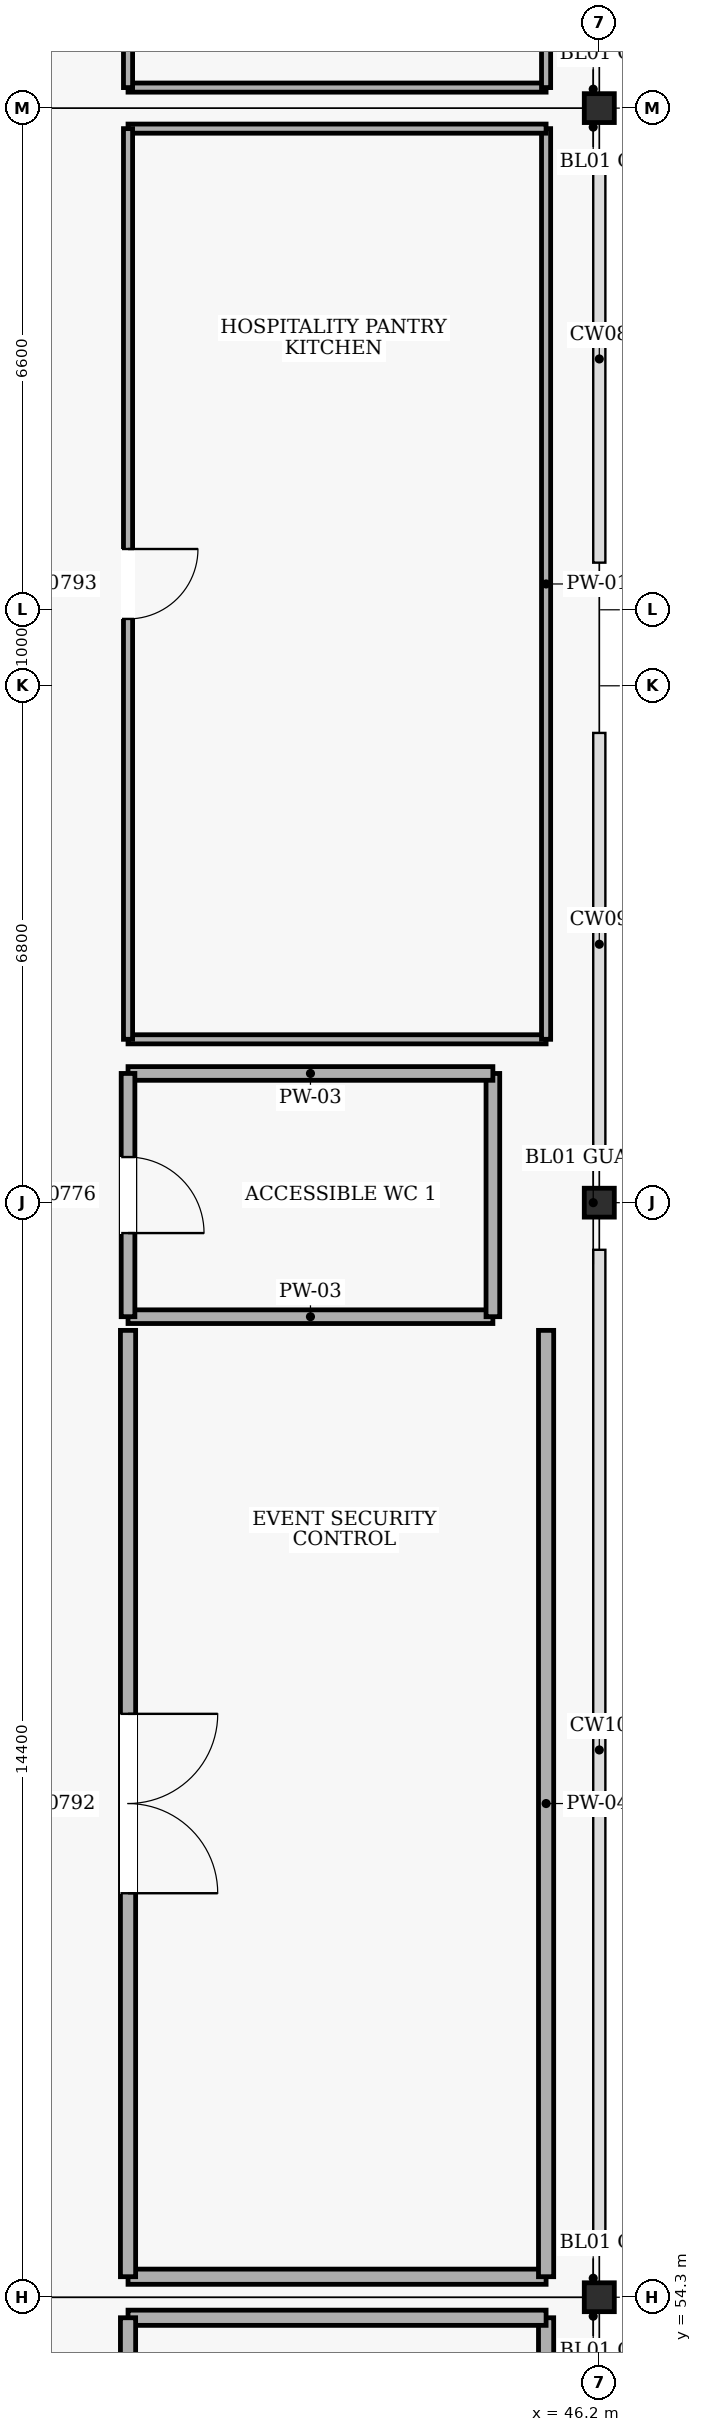
"""IFC4 building model, lengths in metres.
Left out: names, types, materials, properties, quantities, classifications, styles, units other than length and angle.
Written with IfcOpenShell. Run it as: python <this file> out.ifc"""

import sys

from ifc_helpers import new_model, si_unit, direction, frame, frame_2d, origin, origin_2d, place, context, subcontext, project, spatial, rectangle, i_section, extrude, element, fill, save


model = new_model("IFC4")
c1 = context("Model", 3, precision=1e-05, world=origin(), true_north=direction((0.0, 1.0)))
c2 = subcontext(c1, "Body", "Model", "MODEL_VIEW")
j1 = project(units=[si_unit("LENGTHUNIT", "METRE"), si_unit("PLANEANGLEUNIT", "RADIAN")], contexts=[c1])
p1 = place(None, origin())
s1 = spatial("IfcSite", under=j1, at=p1, CompositionType="ELEMENT")
p2 = place(p1, origin())
s2 = spatial("IfcBuilding", under=s1, at=p2, CompositionType="ELEMENT")
p3 = place(p2, frame((0.0, 0.0, 24.6)))
s3 = spatial("IfcBuildingStorey", under=s2, at=p3, CompositionType="ELEMENT", Elevation=24.6)
for number, where, z_axis, x_axis in (
    (1, (46.2, 54.3, 0.0), (0.0, 0.0, 1.0), (1.0, 0.0, 0.0)),
    (2, (46.2, 68.7, 0.0), (0.0, 0.0, 1.0), (1.0, 0.0, 0.0)),
    (3, (46.2, 83.1, 0.0), (0.0, 0.0, 1.0), (1.0, 0.0, 0.0)),
):
    element("IfcColumn", number, at=place(p3, frame(where, z_axis=z_axis, x_axis=x_axis)), inside=s3, PredefinedType="COLUMN", context=c2, shape_type="SweptSolid", body=[
        extrude(i_section(OverallWidth=0.395, OverallDepth=0.38, WebThickness=0.019, FlangeThickness=0.03, at=origin_2d()), origin(), (0.0, 0.0, 1.0), 4.8),
    ])
p4 = place(p3, frame((40.0, 67.2, 0.0), z_axis=(0.0, 0.0, 1.0), x_axis=(1.0, 0.0, 0.0)))
e4 = element("IfcWall", 4, at=p4, inside=s3, PredefinedType="PARTITIONING", context=c2, shape_type="SweptSolid", body=[
    extrude(rectangle(XDim=4.8, YDim=0.18, at=frame_2d((2.4, 0.0))), origin(), (0.0, 0.0, 1.0), 4.5),
])
p5 = place(p3, frame((44.8, 67.2, 0.0), z_axis=(0.0, 0.0, 1.0), x_axis=(0.0, 1.0, 0.0)))
e5 = element("IfcWall", 5, at=p5, inside=s3, PredefinedType="PARTITIONING", context=c2, shape_type="SweptSolid", body=[
    extrude(rectangle(XDim=3.2, YDim=0.18, at=frame_2d((1.6, 0.0))), origin(), (0.0, 0.0, 1.0), 4.5),
])
p6 = place(p3, frame((44.8, 70.4, 0.0), z_axis=(0.0, 0.0, 1.0), x_axis=(-1.0, 0.0, 0.0)))
e6 = element("IfcWall", 6, at=p6, inside=s3, PredefinedType="PARTITIONING", context=c2, shape_type="SweptSolid", body=[
    extrude(rectangle(XDim=4.8, YDim=0.18, at=frame_2d((2.4, 0.0))), origin(), (0.0, 0.0, 1.0), 4.5),
])
p7 = place(p3, frame((40.0, 70.4, 0.0), z_axis=(0.0, 0.0, 1.0), x_axis=(0.0, -1.0, 0.0)))
e7 = element("IfcWall", 7, at=p7, inside=s3, PredefinedType="PARTITIONING", context=c2, shape_type="SweptSolid", body=[
    extrude(rectangle(XDim=3.2, YDim=0.18, at=frame_2d((1.6, 0.0))), origin(), (0.0, 0.0, 1.0), 4.5),
])
p8 = place(p7, frame((1.1, 0.0, 0.0)))
e8 = element("IfcOpeningElement", 8, at=p8, cuts=e7, PredefinedType="OPENING", context=c2, shape_type="SweptSolid", body=[
    extrude(rectangle(XDim=1.0, YDim=2.1, at=frame_2d((0.5, 1.05))), frame((0.0, 0.1, 0.0), z_axis=(0.0, -1.0, 0.0), x_axis=(1.0, 0.0, 0.0)), (0.0, 0.0, 1.0), 0.2),
])
p9 = place(p3, frame((45.5, 45.231, 0.0), z_axis=(0.0, 0.0, 1.0), x_axis=(0.0, 1.0, 0.0)))
e9 = element("IfcWall", 9, at=p9, inside=s3, PredefinedType="PARTITIONING", context=c2, shape_type="SweptSolid", body=[
    extrude(rectangle(XDim=8.799, YDim=0.2, at=frame_2d((4.4, 0.0))), origin(), (0.0, 0.0, 1.0), 4.5),
])
p10 = place(p3, frame((45.5, 54.03, 0.0), z_axis=(0.0, 0.0, 1.0), x_axis=(-1.0, 0.0, 0.0)))
e10 = element("IfcWall", 10, at=p10, inside=s3, PredefinedType="PARTITIONING", context=c2, shape_type="SweptSolid", body=[
    extrude(rectangle(XDim=5.5, YDim=0.2, at=frame_2d((2.75, 0.0))), origin(), (0.0, 0.0, 1.0), 3.78),
])
p11 = place(p3, frame((40.0, 54.03, 0.0), z_axis=(0.0, 0.0, 1.0), x_axis=(0.0, -1.0, 0.0)))
e11 = element("IfcWall", 11, at=p11, inside=s3, PredefinedType="PARTITIONING", context=c2, shape_type="SweptSolid", body=[
    extrude(rectangle(XDim=8.799, YDim=0.2, at=frame_2d((4.4, 0.0))), origin(), (0.0, 0.0, 1.0), 4.5),
])
p12 = place(p11, frame((3.469, 0.0, 0.0)))
e12 = element("IfcOpeningElement", 12, at=p12, cuts=e11, PredefinedType="OPENING", context=c2, shape_type="SweptSolid", body=[
    extrude(rectangle(XDim=1.86, YDim=2.3, at=frame_2d((0.93, 1.15))), frame((0.0, 0.11, 0.0), z_axis=(0.0, -1.0, 0.0), x_axis=(1.0, 0.0, 0.0)), (0.0, 0.0, 1.0), 0.22),
])
p13 = place(p3, frame((40.0, 54.57, 0.0), z_axis=(0.0, 0.0, 1.0), x_axis=(1.0, 0.0, 0.0)))
e13 = element("IfcWall", 13, at=p13, inside=s3, PredefinedType="PARTITIONING", context=c2, shape_type="SweptSolid", body=[
    extrude(rectangle(XDim=5.5, YDim=0.2, at=frame_2d((2.75, 0.0))), origin(), (0.0, 0.0, 1.0), 3.78),
])
p14 = place(p3, frame((45.5, 54.57, 0.0), z_axis=(0.0, 0.0, 1.0), x_axis=(0.0, 1.0, 0.0)))
e14 = element("IfcWall", 14, at=p14, inside=s3, PredefinedType="PARTITIONING", context=c2, shape_type="SweptSolid", body=[
    extrude(rectangle(XDim=12.45, YDim=0.2, at=frame_2d((6.225, 0.0))), origin(), (0.0, 0.0, 1.0), 4.5),
])
p15 = place(p3, frame((40.0, 67.02, 0.0), z_axis=(0.0, 0.0, 1.0), x_axis=(0.0, -1.0, 0.0)))
e15 = element("IfcWall", 15, at=p15, inside=s3, PredefinedType="PARTITIONING", context=c2, shape_type="SweptSolid", body=[
    extrude(rectangle(XDim=12.45, YDim=0.2, at=frame_2d((6.225, 0.0))), origin(), (0.0, 0.0, 1.0), 4.5),
])
p16 = place(p15, frame((5.045, 0.0, 0.0)))
e16 = element("IfcOpeningElement", 16, at=p16, cuts=e15, PredefinedType="OPENING", context=c2, shape_type="SweptSolid", body=[
    extrude(rectangle(XDim=2.36, YDim=2.4, at=frame_2d((1.18, 1.2))), frame((0.0, 0.11, 0.0), z_axis=(0.0, -1.0, 0.0), x_axis=(1.0, 0.0, 0.0)), (0.0, 0.0, 1.0), 0.22),
])
p17 = place(p3, frame((40.0, 70.849, 0.0), z_axis=(0.0, 0.0, 1.0), x_axis=(1.0, 0.0, 0.0)))
e17 = element("IfcWall", 17, at=p17, inside=s3, PredefinedType="PARTITIONING", context=c2, shape_type="SweptSolid", body=[
    extrude(rectangle(XDim=5.5, YDim=0.12, at=frame_2d((2.75, 0.0))), origin(), (0.0, 0.0, 1.0), 4.5),
])
p18 = place(p3, frame((45.5, 70.849, 0.0), z_axis=(0.0, 0.0, 1.0), x_axis=(0.0, 1.0, 0.0)))
e18 = element("IfcWall", 18, at=p18, inside=s3, PredefinedType="PARTITIONING", context=c2, shape_type="SweptSolid", body=[
    extrude(rectangle(XDim=11.981, YDim=0.12, at=frame_2d((5.99, 0.0))), origin(), (0.0, 0.0, 1.0), 4.5),
])
p19 = place(p3, frame((45.5, 82.83, 0.0), z_axis=(0.0, 0.0, 1.0), x_axis=(-1.0, 0.0, 0.0)))
e19 = element("IfcWall", 19, at=p19, inside=s3, PredefinedType="PARTITIONING", context=c2, shape_type="SweptSolid", body=[
    extrude(rectangle(XDim=5.5, YDim=0.12, at=frame_2d((2.75, 0.0))), origin(), (0.0, 0.0, 1.0), 3.78),
])
p20 = place(p3, frame((40.0, 82.83, 0.0), z_axis=(0.0, 0.0, 1.0), x_axis=(0.0, -1.0, 0.0)))
e20 = element("IfcWall", 20, at=p20, inside=s3, PredefinedType="PARTITIONING", context=c2, shape_type="SweptSolid", body=[
    extrude(rectangle(XDim=11.981, YDim=0.12, at=frame_2d((5.99, 0.0))), origin(), (0.0, 0.0, 1.0), 4.5),
])
p21 = place(p20, frame((5.531, 0.0, 0.0)))
e21 = element("IfcOpeningElement", 21, at=p21, cuts=e20, PredefinedType="OPENING", context=c2, shape_type="SweptSolid", body=[
    extrude(rectangle(XDim=0.92, YDim=2.1, at=frame_2d((0.46, 1.05))), frame((0.0, 0.07, 0.0), z_axis=(0.0, -1.0, 0.0), x_axis=(1.0, 0.0, 0.0)), (0.0, 0.0, 1.0), 0.14),
])
p22 = place(p3, frame((40.0, 83.37, 0.0), z_axis=(0.0, 0.0, 1.0), x_axis=(1.0, 0.0, 0.0)))
e22 = element("IfcWall", 22, at=p22, inside=s3, PredefinedType="PARTITIONING", context=c2, shape_type="SweptSolid", body=[
    extrude(rectangle(XDim=5.5, YDim=0.12, at=frame_2d((2.75, 0.0))), origin(), (0.0, 0.0, 1.0), 3.78),
])
p23 = place(p3, frame((45.5, 83.37, 0.0), z_axis=(0.0, 0.0, 1.0), x_axis=(0.0, 1.0, 0.0)))
e23 = element("IfcWall", 23, at=p23, inside=s3, PredefinedType="PARTITIONING", context=c2, shape_type="SweptSolid", body=[
    extrude(rectangle(XDim=8.654, YDim=0.12, at=frame_2d((4.327, 0.0))), origin(), (0.0, 0.0, 1.0), 4.5),
])
p24 = place(p3, frame((40.0, 92.024, 0.0), z_axis=(0.0, 0.0, 1.0), x_axis=(0.0, -1.0, 0.0)))
e24 = element("IfcWall", 24, at=p24, inside=s3, PredefinedType="PARTITIONING", context=c2, shape_type="SweptSolid", body=[
    extrude(rectangle(XDim=8.654, YDim=0.12, at=frame_2d((4.327, 0.0))), origin(), (0.0, 0.0, 1.0), 4.5),
])
p25 = place(p24, frame((3.677, 0.0, 0.0)))
e25 = element("IfcOpeningElement", 25, at=p25, cuts=e24, PredefinedType="OPENING", context=c2, shape_type="SweptSolid", body=[
    extrude(rectangle(XDim=1.3, YDim=2.2, at=frame_2d((0.65, 1.1))), frame((0.0, 0.07, 0.0), z_axis=(0.0, -1.0, 0.0), x_axis=(1.0, 0.0, 0.0)), (0.0, 0.0, 1.0), 0.14),
])
p26 = place(p8, origin())
e26 = element("IfcDoor", 26, at=p26, inside=s3, OperationType="SINGLE_SWING_RIGHT", PredefinedType="DOOR", context=c2, shape_type="SweptSolid", body=[
    extrude(rectangle(XDim=1.0, YDim=2.1, at=frame_2d((0.5, 1.05))), frame((0.0, 0.025, 0.0), z_axis=(0.0, -1.0, 0.0), x_axis=(1.0, 0.0, 0.0)), (0.0, 0.0, 1.0), 0.05),
])
fill(e8, e26)
p27 = place(p16, origin())
e27 = element("IfcDoor", 27, at=p27, inside=s3, OperationType="DOUBLE_DOOR_SINGLE_SWING", PredefinedType="DOOR", context=c2, shape_type="SweptSolid", body=[
    extrude(rectangle(XDim=2.36, YDim=2.4, at=frame_2d((1.18, 1.2))), frame((0.0, 0.025, 0.0), z_axis=(0.0, -1.0, 0.0), x_axis=(1.0, 0.0, 0.0)), (0.0, 0.0, 1.0), 0.05),
])
fill(e16, e27)
p28 = place(p21, origin())
e28 = element("IfcDoor", 28, at=p28, inside=s3, OperationType="SINGLE_SWING_LEFT", PredefinedType="DOOR", context=c2, shape_type="SweptSolid", body=[
    extrude(rectangle(XDim=0.92, YDim=2.1, at=frame_2d((0.46, 1.05))), frame((0.0, 0.025, 0.0), z_axis=(0.0, -1.0, 0.0), x_axis=(1.0, 0.0, 0.0)), (0.0, 0.0, 1.0), 0.05),
])
fill(e21, e28)
save(model, sys.argv[1])
